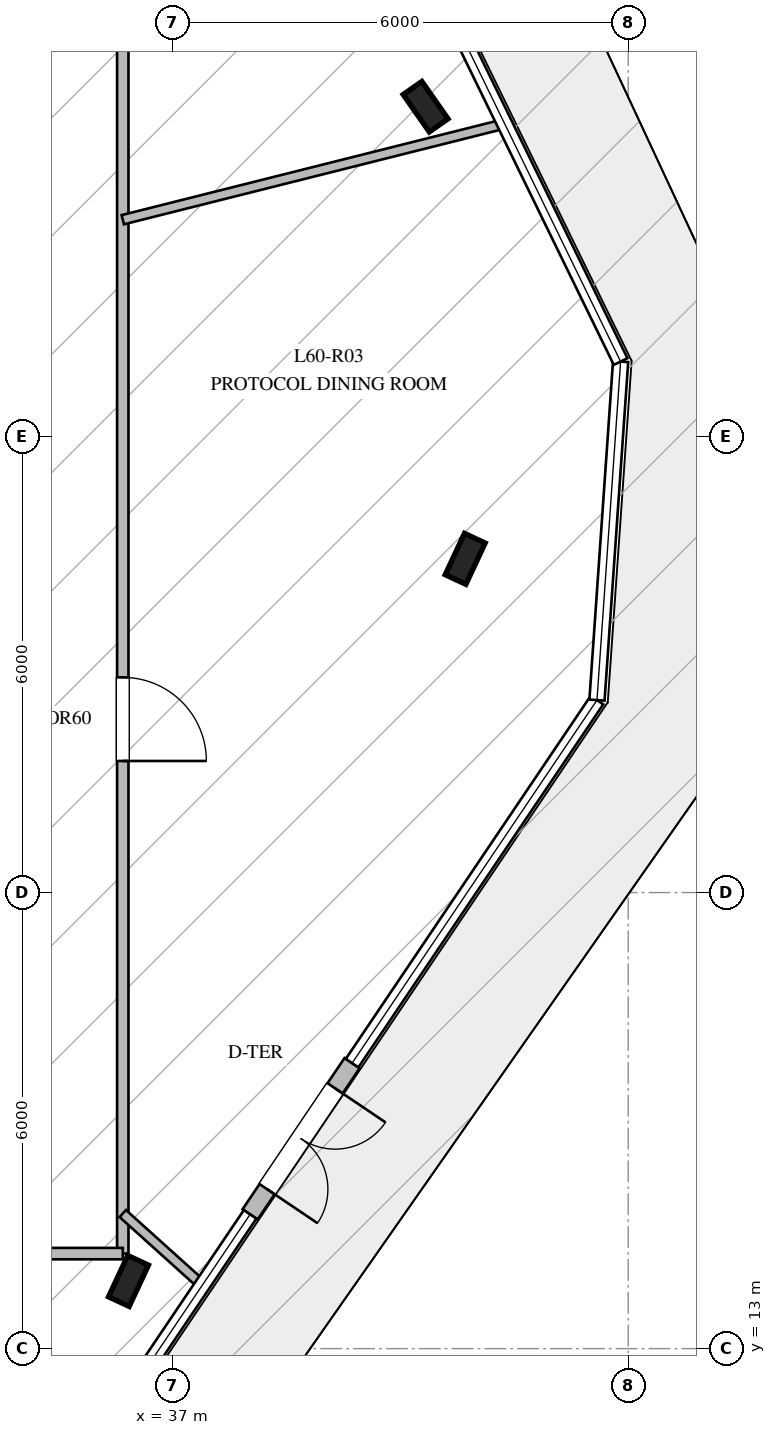
"""IFC4 building model, lengths in metres.
Left out: names, types, materials, properties, quantities, classifications, styles, units other than length and angle.
Written with IfcOpenShell. Run it as: python <this file> out.ifc"""

import sys

from ifc_helpers import new_model, si_unit, direction, frame, frame_2d, origin, origin_2d, place, context, subcontext, project, spatial, rectangle, i_section, extrude, element, fill, save


model = new_model("IFC4")
c1 = context("Model", 3, precision=1e-05, world=origin(), true_north=direction((0.0, 1.0)))
c2 = subcontext(c1, "Body", "Model", "MODEL_VIEW")
j1 = project(units=[si_unit("LENGTHUNIT", "METRE"), si_unit("PLANEANGLEUNIT", "RADIAN")], contexts=[c1])
p1 = place(None, origin())
s1 = spatial("IfcSite", under=j1, at=p1, CompositionType="ELEMENT")
p2 = place(p1, origin())
s2 = spatial("IfcBuilding", under=s1, at=p2, CompositionType="ELEMENT")
p3 = place(p2, frame((0.0, 0.0, 250.2)))
s3 = spatial("IfcBuildingStorey", under=s2, at=p3, CompositionType="ELEMENT", Elevation=250.2)
for number, where, z_axis, x_axis in (
    (1, (36.425, 13.89, -0.27), (0.0, 0.0, 1.0), (0.423, 0.906, 0.0)),
    (2, (40.855, 23.39, -0.27), (0.0, 0.0, 1.0), (0.423, 0.906, 0.0)),
    (3, (40.334, 29.339, -0.27), (0.0, 0.0, 1.0), (-0.574, 0.819, 0.0)),
):
    element("IfcColumn", number, at=place(p3, frame(where, z_axis=z_axis, x_axis=x_axis)), inside=s3, PredefinedType="COLUMN", context=c2, shape_type="SweptSolid", body=[
        extrude(i_section(OverallWidth=0.3, OverallDepth=0.6, WebThickness=0.015, FlangeThickness=0.03, at=origin_2d()), origin(), (0.0, 0.0, 1.0), 4.27),
    ])
p4 = place(p3, frame((38.025, 14.766, 0.0), z_axis=(0.0, 0.0, 1.0), x_axis=(0.559128660759, 0.82908090119, 0.0)))
e4 = element("IfcWall", 4, at=p4, inside=s3, PredefinedType="STANDARD", context=c2, shape_type="SweptSolid", body=[
    extrude(rectangle(XDim=2.4, YDim=0.24, at=frame_2d((1.2, 0.0))), origin(), (0.0, 0.0, 1.0), 3.78),
])
p5 = place(p4, frame((0.4, 0.0, 0.0)))
e5 = element("IfcOpeningElement", 5, at=p5, cuts=e4, PredefinedType="OPENING", context=c2, shape_type="SweptSolid", body=[
    extrude(rectangle(XDim=1.6, YDim=2.25, at=frame_2d((0.8, 1.125))), frame((0.0, 0.13, 0.0), z_axis=(0.0, -1.0, 0.0), x_axis=(1.0, 0.0, 0.0)), (0.0, 0.0, 1.0), 0.26),
])
p6 = place(p3, frame((36.35, 35.75, 0.0), z_axis=(0.0, 0.0, 1.0), x_axis=(0.0, -1.0, 0.0)))
e6 = element("IfcWall", 6, at=p6, inside=s3, PredefinedType="PARTITIONING", context=c2, shape_type="SweptSolid", body=[
    extrude(rectangle(XDim=21.5, YDim=0.15, at=frame_2d((10.75, 0.0))), origin(), (0.0, 0.0, 1.0), 3.25),
])
p7 = place(p6, frame((13.919, 0.0, 0.0)))
e7 = element("IfcOpeningElement", 7, at=p7, cuts=e6, PredefinedType="OPENING", context=c2, shape_type="SweptSolid", body=[
    extrude(rectangle(XDim=1.1, YDim=2.2, at=frame_2d((0.55, 1.1))), frame((0.0, 0.085, 0.0), z_axis=(0.0, -1.0, 0.0), x_axis=(1.0, 0.0, 0.0)), (0.0, 0.0, 1.0), 0.17),
])
p8 = place(p3, frame((36.35, 14.25, 0.0), z_axis=(0.0, 0.0, 1.0), x_axis=(-1.0, 0.0, 0.0)))
e8 = element("IfcWall", 8, at=p8, inside=s3, PredefinedType="PARTITIONING", context=c2, shape_type="SweptSolid", body=[
    extrude(rectangle(XDim=22.7, YDim=0.15, at=frame_2d((11.35, 0.0))), origin(), (0.0, 0.0, 1.0), 3.28),
])
p9 = place(p8, frame((16.67, 0.0, 0.0)))
e9 = element("IfcOpeningElement", 9, at=p9, cuts=e8, PredefinedType="OPENING", context=c2, shape_type="SweptSolid", body=[
    extrude(rectangle(XDim=1.1, YDim=2.2, at=frame_2d((0.55, 1.1))), frame((0.0, 0.085, 0.0), z_axis=(0.0, -1.0, 0.0), x_axis=(1.0, 0.0, 0.0)), (0.0, 0.0, 1.0), 0.17),
])
p10 = place(p8, frame((5.687, 0.0, 0.0)))
e10 = element("IfcOpeningElement", 10, at=p10, cuts=e8, PredefinedType="OPENING", context=c2, shape_type="SweptSolid", body=[
    extrude(rectangle(XDim=1.1, YDim=2.2, at=frame_2d((0.55, 1.1))), frame((0.0, 0.085, 0.0), z_axis=(0.0, -1.0, 0.0), x_axis=(1.0, 0.0, 0.0)), (0.0, 0.0, 1.0), 0.17),
])
p11 = place(p3, frame((36.35, 14.777, 0.0), z_axis=(0.0, 0.0, 1.0), x_axis=(0.743041331361, -0.669245530346, 0.0)))
e11 = element("IfcWall", 11, at=p11, inside=s3, PredefinedType="PARTITIONING", context=c2, shape_type="SweptSolid", body=[
    extrude(rectangle(XDim=1.393, YDim=0.125, at=frame_2d((0.696, 0.0))), origin(), (0.0, 0.0, 1.0), 3.28),
])
p12 = place(p3, frame((36.35, 27.852, 0.0), z_axis=(0.0, 0.0, 1.0), x_axis=(0.969874952969, 0.243603316078, 0.0)))
e12 = element("IfcWall", 12, at=p12, inside=s3, PredefinedType="PARTITIONING", context=c2, shape_type="SweptSolid", body=[
    extrude(rectangle(XDim=5.164, YDim=0.125, at=frame_2d((2.582, 0.0))), origin(), (0.0, 0.0, 1.0), 3.28),
])
p13 = place(p5, frame((1.6, 0.0, 0.0), z_axis=(0.0, 0.0, 1.0), x_axis=(-1.0, 0.0, 0.0)))
e13 = element("IfcDoor", 13, at=p13, inside=s3, OperationType="DOUBLE_DOOR_SINGLE_SWING", PredefinedType="DOOR", context=c2, shape_type="SweptSolid", body=[
    extrude(rectangle(XDim=1.6, YDim=2.25, at=frame_2d((0.8, 1.125))), frame((0.0, 0.025, 0.0), z_axis=(0.0, -1.0, 0.0), x_axis=(1.0, 0.0, 0.0)), (0.0, 0.0, 1.0), 0.05),
])
fill(e5, e13)
p14 = place(p7, origin())
e14 = element("IfcDoor", 14, at=p14, inside=s3, OperationType="SINGLE_SWING_RIGHT", PredefinedType="DOOR", context=c2, shape_type="SweptSolid", body=[
    extrude(rectangle(XDim=1.1, YDim=2.2, at=frame_2d((0.55, 1.1))), frame((0.0, 0.025, 0.0), z_axis=(0.0, -1.0, 0.0), x_axis=(1.0, 0.0, 0.0)), (0.0, 0.0, 1.0), 0.05),
])
fill(e7, e14)
save(model, sys.argv[1])
